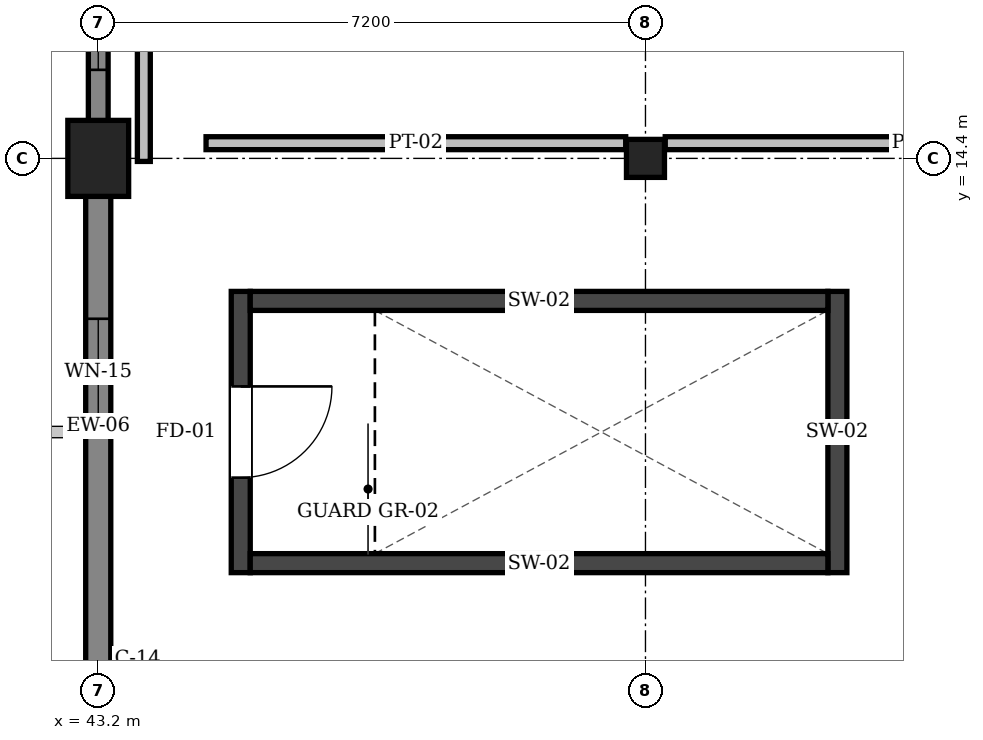
"""IFC4 building model, lengths in metres.
Left out: names, types, materials, properties, quantities, classifications, styles, units other than length and angle.
Written with IfcOpenShell. Run it as: python <this file> out.ifc"""

import sys

from ifc_helpers import new_model, si_unit, direction, frame, frame_2d, origin, origin_2d, place, context, subcontext, project, spatial, rectangle, extrude, element, fill, save


model = new_model("IFC4")
c1 = context("Model", 3, precision=1e-05, world=origin(), true_north=direction((0.0, 1.0)))
c2 = subcontext(c1, "Body", "Model", "MODEL_VIEW")
j1 = project(units=[si_unit("LENGTHUNIT", "METRE"), si_unit("PLANEANGLEUNIT", "RADIAN")], contexts=[c1])
p1 = place(None, origin())
s1 = spatial("IfcSite", under=j1, at=p1, CompositionType="ELEMENT")
p2 = place(p1, origin())
s2 = spatial("IfcBuilding", under=s1, at=p2, CompositionType="ELEMENT")
p3 = place(p2, frame((0.0, 0.0, 32.4)))
s3 = spatial("IfcBuildingStorey", under=s2, at=p3, CompositionType="ELEMENT", Elevation=32.4)
p4 = place(p3, frame((43.2, 14.4, 0.0), z_axis=(0.0, 0.0, 1.0), x_axis=(1.0, 0.0, 0.0)))
e1 = element("IfcColumn", 1, at=p4, inside=s3, PredefinedType="COLUMN", context=c2, shape_type="SweptSolid", body=[
    extrude(rectangle(XDim=0.8, YDim=1.0, at=origin_2d()), origin(), (0.0, 0.0, 1.0), 4.5),
])
p5 = place(p3, frame((50.4, 14.4, 0.0), z_axis=(0.0, 0.0, 1.0), x_axis=(1.0, 0.0, 0.0)))
e2 = element("IfcColumn", 2, at=p5, inside=s3, PredefinedType="COLUMN", context=c2, shape_type="SweptSolid", body=[
    extrude(rectangle(XDim=0.5, YDim=0.5, at=origin_2d()), origin(), (0.0, 0.0, 1.0), 4.5),
])
p6 = place(p3, frame((43.2, 7.366, 0.0), z_axis=(0.0, 0.0, 1.0), x_axis=(0.0, 1.0, 0.0)))
e3 = element("IfcWall", 3, at=p6, inside=s3, PredefinedType="SOLIDWALL", context=c2, shape_type="SweptSolid", body=[
    extrude(rectangle(XDim=7.034, YDim=0.33, at=frame_2d((3.517, 0.0))), origin(), (0.0, 0.0, 1.0), 4.22),
])
p7 = place(p6, frame((3.524, 0.0, 0.95)))
e4 = element("IfcOpeningElement", 4, at=p7, cuts=e3, PredefinedType="OPENING", context=c2, shape_type="SweptSolid", body=[
    extrude(rectangle(XDim=1.4, YDim=1.55, at=frame_2d((0.7, 0.775))), frame((0.0, 0.177, 0.0), z_axis=(0.0, -1.0, 0.0), x_axis=(1.0, 0.0, 0.0)), (0.0, 0.0, 1.0), 0.354),
])
p8 = place(p3, frame((43.2, 14.4, 0.0), z_axis=(0.0, 0.0, 1.0), x_axis=(0.0, 1.0, 0.0)))
e5 = element("IfcWall", 5, at=p8, inside=s3, PredefinedType="SOLIDWALL", context=c2, shape_type="SweptSolid", body=[
    extrude(rectangle(XDim=7.2, YDim=0.26, at=frame_2d((3.6, 0.0))), origin(), (0.0, 0.0, 1.0), 4.22),
])
p9 = place(p8, frame((1.165, 0.0, 0.95)))
e6 = element("IfcOpeningElement", 6, at=p9, cuts=e5, PredefinedType="OPENING", context=c2, shape_type="SweptSolid", body=[
    extrude(rectangle(XDim=1.55, YDim=1.55, at=frame_2d((0.775, 0.775))), frame((0.0, 0.142, 0.0), z_axis=(0.0, -1.0, 0.0), x_axis=(1.0, 0.0, 0.0)), (0.0, 0.0, 1.0), 0.284),
])
p10 = place(p3, frame((45.075, 8.95, 0.0), z_axis=(0.0, 0.0, 1.0), x_axis=(0.0, 1.0, 0.0)))
e7 = element("IfcWall", 7, at=p10, inside=s3, PredefinedType="SHEAR", context=c2, shape_type="SweptSolid", body=[
    extrude(rectangle(XDim=3.7, YDim=0.25, at=frame_2d((1.85, 0.0))), origin(), (0.0, 0.0, 1.0), 4.25),
])
p11 = place(p10, frame((1.25, 0.0, 0.0)))
e8 = element("IfcOpeningElement", 8, at=p11, cuts=e7, PredefinedType="OPENING", context=c2, shape_type="SweptSolid", body=[
    extrude(rectangle(XDim=1.2, YDim=2.15, at=frame_2d((0.6, 1.075))), frame((0.0, 0.137, 0.0), z_axis=(0.0, -1.0, 0.0), x_axis=(1.0, 0.0, 0.0)), (0.0, 0.0, 1.0), 0.274),
])
p12 = place(p3, frame((52.925, 8.95, 0.0), z_axis=(0.0, 0.0, 1.0), x_axis=(0.0, 1.0, 0.0)))
e9 = element("IfcWall", 9, at=p12, inside=s3, PredefinedType="SHEAR", context=c2, shape_type="SweptSolid", body=[
    extrude(rectangle(XDim=3.7, YDim=0.25, at=frame_2d((1.85, 0.0))), origin(), (0.0, 0.0, 1.0), 4.25),
])
for number, where, z_axis, x_axis in (
    (10, (45.2, 9.075, 0.0), (0.0, 0.0, 1.0), (1.0, 0.0, 0.0)),
    (11, (45.2, 12.525, 0.0), (0.0, 0.0, 1.0), (1.0, 0.0, 0.0)),
):
    element("IfcWall", number, at=place(p3, frame(where, z_axis=z_axis, x_axis=x_axis)), inside=s3, PredefinedType="SHEAR", context=c2, shape_type="SweptSolid", body=[
        extrude(rectangle(XDim=7.6, YDim=0.25, at=frame_2d((3.8, 0.0))), origin(), (0.0, 0.0, 1.0), 4.25),
    ])
p13 = place(p3, frame((50.66, 14.6, 0.0), z_axis=(0.0, 0.0, 1.0), x_axis=(1.0, 0.0, 0.0)))
e12 = element("IfcWall", 12, at=p13, inside=s3, PredefinedType="PARTITIONING", context=c2, shape_type="SweptSolid", body=[
    extrude(rectangle(XDim=6.68, YDim=0.17, at=frame_2d((3.34, 0.0))), origin(), (0.0, 0.0, 1.0), 3.78),
])
p14 = place(p3, frame((44.618, 14.6, 0.0), z_axis=(0.0, 0.0, 1.0), x_axis=(1.0, 0.0, 0.0)))
e13 = element("IfcWall", 13, at=p14, inside=s3, PredefinedType="PARTITIONING", context=c2, shape_type="SweptSolid", body=[
    extrude(rectangle(XDim=5.521, YDim=0.17, at=frame_2d((2.761, 0.0))), origin(), (0.0, 0.0, 1.0), 3.78),
])
p15 = place(p3, frame((43.8, 14.36, 0.0), z_axis=(0.0, 0.0, 1.0), x_axis=(0.0, 1.0, 0.0)))
e14 = element("IfcWall", 14, at=p15, inside=s3, PredefinedType="PARTITIONING", context=c2, shape_type="SweptSolid", body=[
    extrude(rectangle(XDim=3.74, YDim=0.17, at=frame_2d((1.87, 0.0))), origin(), (0.0, 0.0, 1.0), 4.16),
])
p16 = place(p7, origin())
e15 = element("IfcWindow", 15, at=p16, inside=s3, PartitioningType="SINGLE_PANEL", PredefinedType="WINDOW", context=c2, shape_type="SweptSolid", body=[
    extrude(rectangle(XDim=1.4, YDim=1.55, at=frame_2d((0.7, 0.775))), frame((0.0, 0.03, 0.0), z_axis=(0.0, -1.0, 0.0), x_axis=(1.0, 0.0, 0.0)), (0.0, 0.0, 1.0), 0.06),
])
fill(e4, e15)
p17 = place(p9, origin())
e16 = element("IfcWindow", 16, at=p17, inside=s3, PartitioningType="SINGLE_PANEL", PredefinedType="WINDOW", context=c2, shape_type="SweptSolid", body=[
    extrude(rectangle(XDim=1.55, YDim=1.55, at=frame_2d((0.775, 0.775))), frame((0.0, 0.03, 0.0), z_axis=(0.0, -1.0, 0.0), x_axis=(1.0, 0.0, 0.0)), (0.0, 0.0, 1.0), 0.06),
])
fill(e6, e16)
p18 = place(p11, frame((1.2, 0.0, 0.0), z_axis=(0.0, 0.0, 1.0), x_axis=(-1.0, 0.0, 0.0)))
e17 = element("IfcDoor", 17, at=p18, inside=s3, OperationType="SINGLE_SWING_LEFT", PredefinedType="DOOR", context=c2, shape_type="SweptSolid", body=[
    extrude(rectangle(XDim=1.2, YDim=2.15, at=frame_2d((0.6, 1.075))), frame((0.0, 0.025, 0.0), z_axis=(0.0, -1.0, 0.0), x_axis=(1.0, 0.0, 0.0)), (0.0, 0.0, 1.0), 0.05),
])
fill(e8, e17)
save(model, sys.argv[1])
